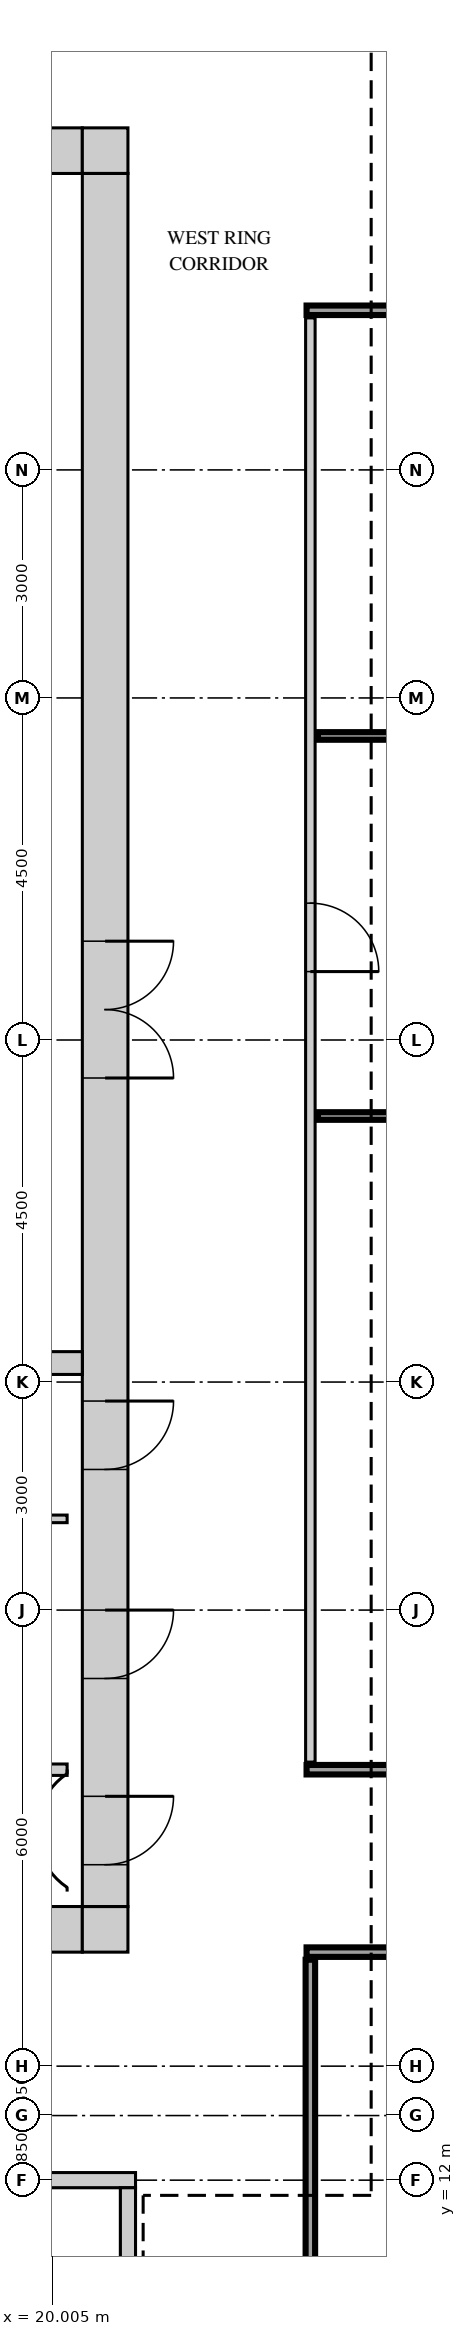
"""IFC4 building model, lengths in metres.
Left out: names, types, materials, properties, quantities, classifications, styles, units other than length and angle.
Written with IfcOpenShell. Run it as: python <this file> out.ifc"""

import sys

from ifc_helpers import new_model, si_unit, direction, frame, frame_2d, origin, place, context, subcontext, project, spatial, rectangle, extrude, source, transform, mapped, element, fill, save


model = new_model("IFC4")
c1 = context("Model", 3, precision=1e-05, world=origin(), true_north=direction((0.0, 1.0)))
c2 = subcontext(c1, "Body", "Model", "MODEL_VIEW")
j1 = project(units=[si_unit("LENGTHUNIT", "METRE"), si_unit("PLANEANGLEUNIT", "RADIAN")], contexts=[c1])
p1 = place(None, origin())
s1 = spatial("IfcSite", under=j1, at=p1, CompositionType="ELEMENT")
p2 = place(p1, origin())
s2 = spatial("IfcBuilding", under=s1, at=p2, CompositionType="ELEMENT")
p3 = place(p2, frame((0.0, 0.0, 314.2)))
s3 = spatial("IfcBuildingStorey", under=s2, at=p3, CompositionType="ELEMENT", Elevation=314.2)
m1 = source(origin(), c2, "Body", "SweptSolid", [
    extrude(rectangle(XDim=14.4, YDim=0.6, at=frame_2d((7.2, 0.0))), origin(), (0.0, 0.0, 1.0), 3.75),
])
p4 = place(p3, frame((6.0, 38.7, 0.0), z_axis=(0.0, 0.0, 1.0), x_axis=(1.0, 0.0, 0.0)))
e1 = element("IfcWall", 1, at=p4, inside=s3, PredefinedType="SHEAR", context=c2, shape_type="MappedRepresentation", body=[
    mapped(m1, transform((0.0, 0.0, 0.0))),
])
m2 = source(origin(), c2, "Body", "SweptSolid", [
    extrude(rectangle(XDim=0.9, YDim=2.1, at=frame_2d((0.45, 1.05))), frame((0.0, 0.31, 0.0), z_axis=(0.0, -1.0, 0.0), x_axis=(1.0, 0.0, 0.0)), (0.0, 0.0, 1.0), 0.62),
])
p5 = place(p4, frame((3.7, 0.0, 0.0)))
e2 = element("IfcOpeningElement", 2, at=p5, cuts=e1, PredefinedType="OPENING", context=c2, shape_type="MappedRepresentation", body=[
    mapped(m2, transform((0.0, 0.0, 0.0))),
])
p6 = place(p4, frame((10.4, 0.0, 0.0)))
e3 = element("IfcOpeningElement", 3, at=p6, cuts=e1, PredefinedType="OPENING", context=c2, shape_type="MappedRepresentation", body=[
    mapped(m2, transform((0.0, 0.0, 0.0))),
])
m3 = source(origin(), c2, "Body", "SweptSolid", [
    extrude(rectangle(XDim=0.6, YDim=0.6, at=frame_2d((0.3, 0.0))), origin(), (0.0, 0.0, 1.0), 3.75),
])
p7 = place(p3, frame((20.4, 38.7, 0.0), z_axis=(0.0, 0.0, 1.0), x_axis=(1.0, 0.0, 0.0)))
e4 = element("IfcWall", 4, at=p7, inside=s3, PredefinedType="SHEAR", context=c2, shape_type="MappedRepresentation", body=[
    mapped(m3, transform((0.0, 0.0, 0.0))),
])
p8 = place(p3, frame((6.0, 15.3, 0.0), z_axis=(0.0, 0.0, 1.0), x_axis=(1.0, 0.0, 0.0)))
e5 = element("IfcWall", 5, at=p8, inside=s3, PredefinedType="SHEAR", context=c2, shape_type="MappedRepresentation", body=[
    mapped(m1, transform((0.0, 0.0, 0.0))),
])
m4 = source(origin(), c2, "Body", "SweptSolid", [
    extrude(rectangle(XDim=1.2, YDim=2.1, at=frame_2d((0.6, 1.05))), frame((0.0, 0.31, 0.0), z_axis=(0.0, -1.0, 0.0), x_axis=(1.0, 0.0, 0.0)), (0.0, 0.0, 1.0), 0.62),
])
p9 = place(p8, frame((6.2, 0.0, 0.0)))
e6 = element("IfcOpeningElement", 6, at=p9, cuts=e5, PredefinedType="OPENING", context=c2, shape_type="MappedRepresentation", body=[
    mapped(m4, transform((0.0, 0.0, 0.0))),
])
p10 = place(p8, frame((2.85, 0.0, 0.0)))
e7 = element("IfcOpeningElement", 7, at=p10, cuts=e5, PredefinedType="OPENING", context=c2, shape_type="MappedRepresentation", body=[
    mapped(m4, transform((0.0, 0.0, 0.0))),
])
m5 = source(origin(), c2, "Body", "SweptSolid", [
    extrude(rectangle(XDim=1.0, YDim=2.1, at=frame_2d((0.5, 1.05))), frame((0.0, 0.31, 0.0), z_axis=(0.0, -1.0, 0.0), x_axis=(1.0, 0.0, 0.0)), (0.0, 0.0, 1.0), 0.62),
])
p11 = place(p8, frame((8.7, 0.0, 0.0)))
e8 = element("IfcOpeningElement", 8, at=p11, cuts=e5, PredefinedType="OPENING", context=c2, shape_type="MappedRepresentation", body=[
    mapped(m5, transform((0.0, 0.0, 0.0))),
])
p12 = place(p3, frame((20.4, 15.3, 0.0), z_axis=(0.0, 0.0, 1.0), x_axis=(1.0, 0.0, 0.0)))
e9 = element("IfcWall", 9, at=p12, inside=s3, PredefinedType="SHEAR", context=c2, shape_type="MappedRepresentation", body=[
    mapped(m3, transform((0.0, 0.0, 0.0))),
])
m6 = source(origin(), c2, "Body", "SweptSolid", [
    extrude(rectangle(XDim=22.8, YDim=0.6, at=frame_2d((11.4, 0.0))), origin(), (0.0, 0.0, 1.0), 3.75),
])
p13 = place(p3, frame((20.7, 15.6, 0.0), z_axis=(0.0, 0.0, 1.0), x_axis=(0.0, 1.0, 0.0)))
e10 = element("IfcWall", 10, at=p13, inside=s3, PredefinedType="SHEAR", context=c2, shape_type="MappedRepresentation", body=[
    mapped(m6, transform((0.0, 0.0, 0.0))),
])
m7 = source(origin(), c2, "Body", "SweptSolid", [
    extrude(rectangle(XDim=1.8, YDim=2.1, at=frame_2d((0.9, 1.05))), frame((0.0, 0.31, 0.0), z_axis=(0.0, -1.0, 0.0), x_axis=(1.0, 0.0, 0.0)), (0.0, 0.0, 1.0), 0.62),
])
p14 = place(p13, frame((10.9, 0.0, 0.0)))
e11 = element("IfcOpeningElement", 11, at=p14, cuts=e10, PredefinedType="OPENING", context=c2, shape_type="MappedRepresentation", body=[
    mapped(m7, transform((0.0, 0.0, 0.0))),
])
p15 = place(p13, frame((0.55, 0.0, 0.0)))
e12 = element("IfcOpeningElement", 12, at=p15, cuts=e10, PredefinedType="OPENING", context=c2, shape_type="MappedRepresentation", body=[
    mapped(m2, transform((0.0, 0.0, 0.0))),
])
p16 = place(p13, frame((3.0, 0.0, 0.0)))
e13 = element("IfcOpeningElement", 13, at=p16, cuts=e10, PredefinedType="OPENING", context=c2, shape_type="MappedRepresentation", body=[
    mapped(m2, transform((0.0, 0.0, 0.0))),
])
p17 = place(p13, frame((5.75, 0.0, 0.0)))
e14 = element("IfcOpeningElement", 14, at=p17, cuts=e10, PredefinedType="OPENING", context=c2, shape_type="MappedRepresentation", body=[
    mapped(m2, transform((0.0, 0.0, 0.0))),
])
m8 = source(origin(), c2, "Body", "SweptSolid", [
    extrude(rectangle(XDim=7.2, YDim=0.2, at=frame_2d((3.6, 0.0))), origin(), (0.0, 0.0, 1.0), 3.75),
])
p18 = place(p3, frame((13.9, 12.0, 0.0), z_axis=(0.0, 0.0, 1.0), x_axis=(1.0, 0.0, 0.0)))
e15 = element("IfcWall", 15, at=p18, inside=s3, PredefinedType="SHEAR", context=c2, shape_type="MappedRepresentation", body=[
    mapped(m8, transform((0.0, 0.0, 0.0))),
])
m9 = source(origin(), c2, "Body", "SweptSolid", [
    extrude(rectangle(XDim=3.35, YDim=0.2, at=frame_2d((1.675, 0.0))), origin(), (0.0, 0.0, 1.0), 3.75),
])
p19 = place(p3, frame((21.0, 8.55, 0.0), z_axis=(0.0, 0.0, 1.0), x_axis=(0.0, 1.0, 0.0)))
e16 = element("IfcWall", 16, at=p19, inside=s3, PredefinedType="SHEAR", context=c2, shape_type="MappedRepresentation", body=[
    mapped(m9, transform((0.0, 0.0, 0.0))),
])
m10 = source(origin(), c2, "Body", "SweptSolid", [
    extrude(rectangle(XDim=13.2, YDim=0.3, at=frame_2d((6.6, 0.0))), origin(), (0.0, 0.0, 1.0), 3.75),
])
p20 = place(p3, frame((7.2, 22.75, 0.0), z_axis=(0.0, 0.0, 1.0), x_axis=(1.0, 0.0, 0.0)))
e17 = element("IfcWall", 17, at=p20, inside=s3, PredefinedType="STANDARD", context=c2, shape_type="MappedRepresentation", body=[
    mapped(m10, transform((0.0, 0.0, 0.0))),
])
m11 = source(origin(), c2, "Body", "SweptSolid", [
    extrude(rectangle(XDim=8.75, YDim=0.125, at=frame_2d((4.375, 0.0))), origin(), (0.0, 0.0, 1.0), 3.8),
])
p21 = place(p3, frame((23.4, 6.15, 0.0), z_axis=(0.0, 0.0, 1.0), x_axis=(0.0, 1.0, 0.0)))
e18 = element("IfcWall", 18, at=p21, inside=s3, PredefinedType="PARTITIONING", context=c2, shape_type="MappedRepresentation", body=[
    mapped(m11, transform((0.0, 0.0, 0.0))),
])
m12 = source(origin(), c2, "Body", "SweptSolid", [
    extrude(rectangle(XDim=19.1, YDim=0.125, at=frame_2d((9.55, 0.0))), origin(), (0.0, 0.0, 1.0), 3.8),
])
p22 = place(p3, frame((23.35, 15.0, 0.0), z_axis=(0.0, 0.0, 1.0), x_axis=(1.0, 0.0, 0.0)))
e19 = element("IfcWall", 19, at=p22, inside=s3, PredefinedType="PARTITIONING", context=c2, shape_type="MappedRepresentation", body=[
    mapped(m12, transform((0.0, 0.0, 0.0))),
])
m13 = source(origin(), c2, "Body", "SweptSolid", [
    extrude(rectangle(XDim=1.2, YDim=2.1, at=frame_2d((0.6, 1.05))), frame((0.0, 0.073, 0.0), z_axis=(0.0, -1.0, 0.0), x_axis=(1.0, 0.0, 0.0)), (0.0, 0.0, 1.0), 0.145),
])
p23 = place(p22, frame((7.75, 0.0, 0.0)))
e20 = element("IfcOpeningElement", 20, at=p23, cuts=e19, PredefinedType="OPENING", context=c2, shape_type="MappedRepresentation", body=[
    mapped(m13, transform((0.0, 0.0, 0.0))),
])
m14 = source(origin(), c2, "Body", "SweptSolid", [
    extrude(rectangle(XDim=4.0, YDim=0.15, at=frame_2d((2.0, 0.0))), origin(), (0.0, 0.0, 1.0), 3.8),
])
p24 = place(p3, frame((16.2, 17.4, 0.0), z_axis=(0.0, 0.0, 1.0), x_axis=(1.0, 0.0, 0.0)))
e21 = element("IfcWall", 21, at=p24, inside=s3, PredefinedType="PARTITIONING", context=c2, shape_type="MappedRepresentation", body=[
    mapped(m14, transform((0.0, 0.0, 0.0))),
])
m15 = source(origin(), c2, "Body", "SweptSolid", [
    extrude(rectangle(XDim=16.7, YDim=0.125, at=frame_2d((8.35, 0.0))), origin(), (0.0, 0.0, 1.0), 3.8),
])
p25 = place(p3, frame((23.35, 17.4, 0.0), z_axis=(0.0, 0.0, 1.0), x_axis=(1.0, 0.0, 0.0)))
e22 = element("IfcWall", 22, at=p25, inside=s3, PredefinedType="PARTITIONING", context=c2, shape_type="MappedRepresentation", body=[
    mapped(m15, transform((0.0, 0.0, 0.0))),
])
p26 = place(p25, frame((7.75, 0.0, 0.0)))
e23 = element("IfcOpeningElement", 23, at=p26, cuts=e22, PredefinedType="OPENING", context=c2, shape_type="MappedRepresentation", body=[
    mapped(m13, transform((0.0, 0.0, 0.0))),
])
m16 = source(origin(), c2, "Body", "SweptSolid", [
    extrude(rectangle(XDim=19.0, YDim=0.125, at=frame_2d((9.5, 0.0))), origin(), (0.0, 0.0, 1.0), 3.8),
])
p27 = place(p3, frame((23.4, 17.5, 0.0), z_axis=(0.0, 0.0, 1.0), x_axis=(0.0, 1.0, 0.0)))
e24 = element("IfcWall", 24, at=p27, inside=s3, PredefinedType="PARTITIONING", context=c2, shape_type="MappedRepresentation", body=[
    mapped(m16, transform((0.0, 0.0, 0.0))),
])
m17 = source(origin(), c2, "Body", "SweptSolid", [
    extrude(rectangle(XDim=0.9, YDim=2.1, at=frame_2d((0.45, 1.05))), frame((0.0, 0.073, 0.0), z_axis=(0.0, -1.0, 0.0), x_axis=(1.0, 0.0, 0.0)), (0.0, 0.0, 1.0), 0.145),
])
p28 = place(p27, frame((10.4, 0.0, 0.0)))
e25 = element("IfcOpeningElement", 25, at=p28, cuts=e24, PredefinedType="OPENING", context=c2, shape_type="MappedRepresentation", body=[
    mapped(m17, transform((0.0, 0.0, 0.0))),
])
m18 = source(origin(), c2, "Body", "SweptSolid", [
    extrude(rectangle(XDim=4.1, YDim=0.1, at=frame_2d((2.05, 0.0))), origin(), (0.0, 0.0, 1.0), 3.8),
])
p29 = place(p3, frame((16.1, 20.7, 0.0), z_axis=(0.0, 0.0, 1.0), x_axis=(1.0, 0.0, 0.0)))
e26 = element("IfcWall", 26, at=p29, inside=s3, PredefinedType="PARTITIONING", context=c2, shape_type="MappedRepresentation", body=[
    mapped(m18, transform((0.0, 0.0, 0.0))),
])
m19 = source(origin(), c2, "Body", "SweptSolid", [
    extrude(rectangle(XDim=16.4, YDim=0.1, at=frame_2d((8.2, 0.0))), origin(), (0.0, 0.0, 1.0), 3.8),
])
for number, where, z_axis, x_axis in (
    (27, (23.5, 26.0, 0.0), (0.0, 0.0, 1.0), (1.0, 0.0, 0.0)),
    (28, (23.5, 31.0, 0.0), (0.0, 0.0, 1.0), (1.0, 0.0, 0.0)),
):
    element("IfcWall", number, at=place(p3, frame(where, z_axis=z_axis, x_axis=x_axis)), inside=s3, PredefinedType="PARTITIONING", context=c2, shape_type="MappedRepresentation", body=[
        mapped(m19, transform((0.0, 0.0, 0.0))),
    ])
p30 = place(p3, frame((23.35, 36.6, 0.0), z_axis=(0.0, 0.0, 1.0), x_axis=(1.0, 0.0, 0.0)))
e29 = element("IfcWall", 29, at=p30, inside=s3, PredefinedType="PARTITIONING", context=c2, shape_type="MappedRepresentation", body=[
    mapped(m15, transform((0.0, 0.0, 0.0))),
])
p31 = place(p30, frame((8.05, 0.0, 0.0)))
e30 = element("IfcOpeningElement", 30, at=p31, cuts=e29, PredefinedType="OPENING", context=c2, shape_type="MappedRepresentation", body=[
    mapped(m17, transform((0.0, 0.0, 0.0))),
])
m20 = source(origin(), c2, "Body", "SweptSolid", [
    extrude(rectangle(XDim=1.8, YDim=2.1, at=frame_2d((0.9, 1.05))), frame((0.0, 0.25, 0.0), z_axis=(0.0, -1.0, 0.0), x_axis=(1.0, 0.0, 0.0)), (0.0, 0.0, 1.0), 0.5),
])
p32 = place(p14, origin())
e31 = element("IfcDoor", 31, at=p32, inside=s3, OperationType="DOUBLE_DOOR_SINGLE_SWING", PredefinedType="DOOR", context=c2, shape_type="MappedRepresentation", body=[
    mapped(m20, transform((0.0, 0.0, 0.0))),
])
fill(e11, e31)
m21 = source(origin(), c2, "Body", "SweptSolid", [
    extrude(rectangle(XDim=0.9, YDim=2.1, at=frame_2d((0.45, 1.05))), frame((0.0, 0.25, 0.0), z_axis=(0.0, -1.0, 0.0), x_axis=(1.0, 0.0, 0.0)), (0.0, 0.0, 1.0), 0.5),
])
p33 = place(p15, origin())
e32 = element("IfcDoor", 32, at=p33, inside=s3, OperationType="SINGLE_SWING_RIGHT", PredefinedType="DOOR", context=c2, shape_type="MappedRepresentation", body=[
    mapped(m21, transform((0.0, 0.0, 0.0))),
])
fill(e12, e32)
p34 = place(p16, origin())
e33 = element("IfcDoor", 33, at=p34, inside=s3, OperationType="SINGLE_SWING_RIGHT", PredefinedType="DOOR", context=c2, shape_type="MappedRepresentation", body=[
    mapped(m21, transform((0.0, 0.0, 0.0))),
])
fill(e13, e33)
p35 = place(p17, origin())
e34 = element("IfcDoor", 34, at=p35, inside=s3, OperationType="SINGLE_SWING_RIGHT", PredefinedType="DOOR", context=c2, shape_type="MappedRepresentation", body=[
    mapped(m21, transform((0.0, 0.0, 0.0))),
])
fill(e14, e34)
m22 = source(origin(), c2, "Body", "SweptSolid", [
    extrude(rectangle(XDim=0.9, YDim=2.1, at=frame_2d((0.45, 1.05))), frame((0.0, 0.025, 0.0), z_axis=(0.0, -1.0, 0.0), x_axis=(1.0, 0.0, 0.0)), (0.0, 0.0, 1.0), 0.05),
])
p36 = place(p28, origin())
e35 = element("IfcDoor", 35, at=p36, inside=s3, OperationType="SINGLE_SWING_LEFT", PredefinedType="DOOR", context=c2, shape_type="MappedRepresentation", body=[
    mapped(m22, transform((0.0, 0.0, 0.0))),
])
fill(e25, e35)
save(model, sys.argv[1])
